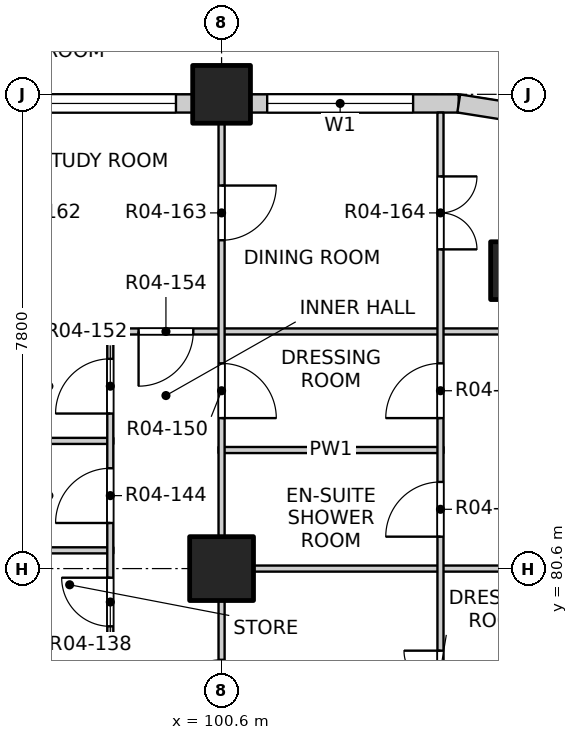
"""IFC4 building model, lengths in metres.
Left out: names, types, materials, properties, quantities, classifications, styles, units other than length and angle.
Written with IfcOpenShell. Run it as: python <this file> out.ifc"""

import sys

from ifc_helpers import new_model, si_unit, direction, frame, frame_2d, origin, origin_2d, place, context, subcontext, project, spatial, rectangle, extrude, element, fill, save


model = new_model("IFC4")
c1 = context("Model", 3, precision=1e-05, world=origin(), true_north=direction((0.0, 1.0)))
c2 = subcontext(c1, "Body", "Model", "MODEL_VIEW")
j1 = project(units=[si_unit("LENGTHUNIT", "METRE"), si_unit("PLANEANGLEUNIT", "RADIAN")], contexts=[c1])
p1 = place(None, origin())
s1 = spatial("IfcSite", under=j1, at=p1, CompositionType="ELEMENT")
p2 = place(p1, origin())
s2 = spatial("IfcBuilding", under=s1, at=p2, CompositionType="ELEMENT")
p3 = place(p2, frame((0.0, 0.0, 58.0)))
s3 = spatial("IfcBuildingStorey", under=s2, at=p3, CompositionType="ELEMENT", Elevation=58.0)
for number, where, z_axis, x_axis in (
    (1, (105.5, 85.5, -0.25), (0.0, 0.0, 1.0), (1.0, 0.0, 0.0)),
    (2, (100.6, 88.4, -0.25), (0.0, 0.0, 1.0), (1.0, 0.0, 0.0)),
):
    element("IfcColumn", number, at=place(p3, frame(where, z_axis=z_axis, x_axis=x_axis)), inside=s3, PredefinedType="COLUMN", context=c2, shape_type="SweptSolid", body=[
        extrude(rectangle(XDim=0.95, YDim=0.95, at=origin_2d()), origin(), (0.0, 0.0, 1.0), 3.4),
    ])
p4 = place(p3, frame((100.6, 80.6, -0.25), z_axis=(0.0, 0.0, 1.0), x_axis=(1.0, 0.0, 0.0)))
e3 = element("IfcColumn", 3, at=p4, inside=s3, PredefinedType="COLUMN", context=c2, shape_type="SweptSolid", body=[
    extrude(rectangle(XDim=1.05, YDim=1.05, at=origin_2d()), origin(), (0.0, 0.0, 1.0), 3.4),
])
p5 = place(p3, frame((93.275, 88.25, 0.0), z_axis=(0.0, 0.0, 1.0), x_axis=(1.0, 0.0, 0.0)))
e4 = element("IfcWall", 4, at=p5, inside=s3, PredefinedType="SOLIDWALL", context=c2, shape_type="SweptSolid", body=[
    extrude(rectangle(XDim=6.85, YDim=0.3, at=frame_2d((3.425, 0.0))), origin(), (0.0, 0.0, 1.0), 2.7),
])
p6 = place(p5, frame((0.275, 0.0, 0.9)))
e5 = element("IfcOpeningElement", 5, at=p6, cuts=e4, PredefinedType="OPENING", context=c2, shape_type="SweptSolid", body=[
    extrude(rectangle(XDim=2.4, YDim=1.8, at=frame_2d((1.2, 0.9))), frame((0.0, 0.16, 0.0), z_axis=(0.0, -1.0, 0.0), x_axis=(1.0, 0.0, 0.0)), (0.0, 0.0, 1.0), 0.32),
])
p7 = place(p5, frame((4.175, 0.0, 0.9)))
e6 = element("IfcOpeningElement", 6, at=p7, cuts=e4, PredefinedType="OPENING", context=c2, shape_type="SweptSolid", body=[
    extrude(rectangle(XDim=2.4, YDim=1.8, at=frame_2d((1.2, 0.9))), frame((0.0, 0.16, 0.0), z_axis=(0.0, -1.0, 0.0), x_axis=(1.0, 0.0, 0.0)), (0.0, 0.0, 1.0), 0.32),
])
p8 = place(p3, frame((101.075, 88.25, 0.0), z_axis=(0.0, 0.0, 1.0), x_axis=(1.0, 0.0, 0.0)))
e7 = element("IfcWall", 7, at=p8, inside=s3, PredefinedType="SOLIDWALL", context=c2, shape_type="SweptSolid", body=[
    extrude(rectangle(XDim=3.425, YDim=0.3, at=frame_2d((1.712, 0.0))), origin(), (0.0, 0.0, 1.0), 2.7),
])
p9 = place(p8, frame((0.275, 0.0, 0.9)))
e8 = element("IfcOpeningElement", 8, at=p9, cuts=e7, PredefinedType="OPENING", context=c2, shape_type="SweptSolid", body=[
    extrude(rectangle(XDim=2.4, YDim=1.8, at=frame_2d((1.2, 0.9))), frame((0.0, 0.16, 0.0), z_axis=(0.0, -1.0, 0.0), x_axis=(1.0, 0.0, 0.0)), (0.0, 0.0, 1.0), 0.32),
])
p10 = place(p3, frame((105.659, 88.066, 0.0), z_axis=(0.0, 0.0, 1.0), x_axis=(-0.987678452879, 0.156496880861, 0.0)))
e9 = element("IfcWall", 9, at=p10, inside=s3, PredefinedType="SOLIDWALL", context=c2, shape_type="SweptSolid", body=[
    extrude(rectangle(XDim=1.173, YDim=0.3, at=frame_2d((0.586, 0.0))), origin(), (0.0, 0.0, 1.0), 2.7),
])
p11 = place(p3, frame((96.6, 79.2, 0.0), z_axis=(0.0, 0.0, 1.0), x_axis=(1.0, 0.0, 0.0)))
e10 = element("IfcWall", 10, at=p11, inside=s3, PredefinedType="PARTITIONING", context=c2, shape_type="SweptSolid", body=[
    extrude(rectangle(XDim=2.22, YDim=0.1, at=frame_2d((1.11, 0.0))), origin(), (0.0, 0.0, 1.0), 3.15),
])
p12 = place(p3, frame((100.55, 80.6, 0.0), z_axis=(0.0, 0.0, 1.0), x_axis=(1.0, 0.0, 0.0)))
e11 = element("IfcWall", 11, at=p12, inside=s3, PredefinedType="PARTITIONING", context=c2, shape_type="SweptSolid", body=[
    extrude(rectangle(XDim=7.55, YDim=0.1, at=frame_2d((3.775, 0.0))), origin(), (0.0, 0.0, 1.0), 2.55),
])
p13 = place(p3, frame((96.6, 80.9, 0.0), z_axis=(0.0, 0.0, 1.0), x_axis=(1.0, 0.0, 0.0)))
e12 = element("IfcWall", 12, at=p13, inside=s3, PredefinedType="PARTITIONING", context=c2, shape_type="SweptSolid", body=[
    extrude(rectangle(XDim=2.22, YDim=0.1, at=frame_2d((1.11, 0.0))), origin(), (0.0, 0.0, 1.0), 3.15),
])
p14 = place(p3, frame((100.55, 82.55, 0.0), z_axis=(0.0, 0.0, 1.0), x_axis=(1.0, 0.0, 0.0)))
e13 = element("IfcWall", 13, at=p14, inside=s3, PredefinedType="PARTITIONING", context=c2, shape_type="SweptSolid", body=[
    extrude(rectangle(XDim=3.7, YDim=0.1, at=frame_2d((1.85, 0.0))), origin(), (0.0, 0.0, 1.0), 3.15),
])
p15 = place(p3, frame((96.6, 82.7, 0.0), z_axis=(0.0, 0.0, 1.0), x_axis=(1.0, 0.0, 0.0)))
e14 = element("IfcWall", 14, at=p15, inside=s3, PredefinedType="PARTITIONING", context=c2, shape_type="SweptSolid", body=[
    extrude(rectangle(XDim=2.22, YDim=0.1, at=frame_2d((1.11, 0.0))), origin(), (0.0, 0.0, 1.0), 3.15),
])
p16 = place(p3, frame((96.6, 84.5, 0.0), z_axis=(0.0, 0.0, 1.0), x_axis=(1.0, 0.0, 0.0)))
e15 = element("IfcWall", 15, at=p16, inside=s3, PredefinedType="PARTITIONING", context=c2, shape_type="SweptSolid", body=[
    extrude(rectangle(XDim=11.5, YDim=0.1, at=frame_2d((5.75, 0.0))), origin(), (0.0, 0.0, 1.0), 3.15),
])
p17 = place(p16, frame((2.635, 0.0, 0.0)))
e16 = element("IfcOpeningElement", 16, at=p17, cuts=e15, PredefinedType="OPENING", context=c2, shape_type="SweptSolid", body=[
    extrude(rectangle(XDim=0.9, YDim=2.1, at=frame_2d((0.45, 1.05))), frame((0.0, 0.06, 0.0), z_axis=(0.0, -1.0, 0.0), x_axis=(1.0, 0.0, 0.0)), (0.0, 0.0, 1.0), 0.12),
])
p18 = place(p3, frame((98.77, 79.25, 0.0), z_axis=(0.0, 0.0, 1.0), x_axis=(0.0, 1.0, 0.0)))
e17 = element("IfcWall", 17, at=p18, inside=s3, PredefinedType="PARTITIONING", context=c2, shape_type="SweptSolid", body=[
    extrude(rectangle(XDim=5.2, YDim=0.1, at=frame_2d((2.6, 0.0))), origin(), (0.0, 0.0, 1.0), 3.15),
])
p19 = place(p18, frame((0.4, 0.0, 0.0)))
e18 = element("IfcOpeningElement", 18, at=p19, cuts=e17, PredefinedType="OPENING", context=c2, shape_type="SweptSolid", body=[
    extrude(rectangle(XDim=0.8, YDim=2.1, at=frame_2d((0.4, 1.05))), frame((0.0, 0.06, 0.0), z_axis=(0.0, -1.0, 0.0), x_axis=(1.0, 0.0, 0.0)), (0.0, 0.0, 1.0), 0.12),
])
p20 = place(p18, frame((2.1, 0.0, 0.0)))
e19 = element("IfcOpeningElement", 19, at=p20, cuts=e17, PredefinedType="OPENING", context=c2, shape_type="SweptSolid", body=[
    extrude(rectangle(XDim=0.9, YDim=2.1, at=frame_2d((0.45, 1.05))), frame((0.0, 0.06, 0.0), z_axis=(0.0, -1.0, 0.0), x_axis=(1.0, 0.0, 0.0)), (0.0, 0.0, 1.0), 0.12),
])
p21 = place(p18, frame((3.9, 0.0, 0.0)))
e20 = element("IfcOpeningElement", 20, at=p21, cuts=e17, PredefinedType="OPENING", context=c2, shape_type="SweptSolid", body=[
    extrude(rectangle(XDim=0.9, YDim=2.1, at=frame_2d((0.45, 1.05))), frame((0.0, 0.06, 0.0), z_axis=(0.0, -1.0, 0.0), x_axis=(1.0, 0.0, 0.0)), (0.0, 0.0, 1.0), 0.12),
])
p22 = place(p3, frame((100.6, 49.4, 0.0), z_axis=(0.0, 0.0, 1.0), x_axis=(0.0, 1.0, 0.0)))
e21 = element("IfcWall", 21, at=p22, inside=s3, PredefinedType="PARTITIONING", context=c2, shape_type="SweptSolid", body=[
    extrude(rectangle(XDim=31.2, YDim=0.1, at=frame_2d((15.6, 0.0))), origin(), (0.0, 0.0, 1.0), 3.15),
])
p23 = place(p22, frame((2.475, 0.0, 0.0)))
e22 = element("IfcOpeningElement", 22, at=p23, cuts=e21, PredefinedType="OPENING", context=c2, shape_type="SweptSolid", body=[
    extrude(rectangle(XDim=0.9, YDim=2.1, at=frame_2d((0.45, 1.05))), frame((0.0, 0.06, 0.0), z_axis=(0.0, -1.0, 0.0), x_axis=(1.0, 0.0, 0.0)), (0.0, 0.0, 1.0), 0.12),
])
p24 = place(p22, frame((5.4, 0.0, 0.0)))
e23 = element("IfcOpeningElement", 23, at=p24, cuts=e21, PredefinedType="OPENING", context=c2, shape_type="SweptSolid", body=[
    extrude(rectangle(XDim=0.9, YDim=2.1, at=frame_2d((0.45, 1.05))), frame((0.0, 0.06, 0.0), z_axis=(0.0, -1.0, 0.0), x_axis=(1.0, 0.0, 0.0)), (0.0, 0.0, 1.0), 0.12),
])
p25 = place(p22, frame((10.275, 0.0, 0.0)))
e24 = element("IfcOpeningElement", 24, at=p25, cuts=e21, PredefinedType="OPENING", context=c2, shape_type="SweptSolid", body=[
    extrude(rectangle(XDim=0.9, YDim=2.1, at=frame_2d((0.45, 1.05))), frame((0.0, 0.06, 0.0), z_axis=(0.0, -1.0, 0.0), x_axis=(1.0, 0.0, 0.0)), (0.0, 0.0, 1.0), 0.12),
])
p26 = place(p22, frame((13.2, 0.0, 0.0)))
e25 = element("IfcOpeningElement", 25, at=p26, cuts=e21, PredefinedType="OPENING", context=c2, shape_type="SweptSolid", body=[
    extrude(rectangle(XDim=0.9, YDim=2.1, at=frame_2d((0.45, 1.05))), frame((0.0, 0.06, 0.0), z_axis=(0.0, -1.0, 0.0), x_axis=(1.0, 0.0, 0.0)), (0.0, 0.0, 1.0), 0.12),
])
p27 = place(p22, frame((17.1, 0.0, 0.0)))
e26 = element("IfcOpeningElement", 26, at=p27, cuts=e21, PredefinedType="OPENING", context=c2, shape_type="SweptSolid", body=[
    extrude(rectangle(XDim=0.9, YDim=2.1, at=frame_2d((0.45, 1.05))), frame((0.0, 0.06, 0.0), z_axis=(0.0, -1.0, 0.0), x_axis=(1.0, 0.0, 0.0)), (0.0, 0.0, 1.0), 0.12),
])
p28 = place(p22, frame((21.8, 0.0, 0.0)))
e27 = element("IfcOpeningElement", 27, at=p28, cuts=e21, PredefinedType="OPENING", context=c2, shape_type="SweptSolid", body=[
    extrude(rectangle(XDim=0.9, YDim=2.1, at=frame_2d((0.45, 1.05))), frame((0.0, 0.06, 0.0), z_axis=(0.0, -1.0, 0.0), x_axis=(1.0, 0.0, 0.0)), (0.0, 0.0, 1.0), 0.12),
])
p29 = place(p22, frame((25.875, 0.0, 0.0)))
e28 = element("IfcOpeningElement", 28, at=p29, cuts=e21, PredefinedType="OPENING", context=c2, shape_type="SweptSolid", body=[
    extrude(rectangle(XDim=0.9, YDim=2.1, at=frame_2d((0.45, 1.05))), frame((0.0, 0.06, 0.0), z_axis=(0.0, -1.0, 0.0), x_axis=(1.0, 0.0, 0.0)), (0.0, 0.0, 1.0), 0.12),
])
p30 = place(p22, frame((28.8, 0.0, 0.0)))
e29 = element("IfcOpeningElement", 29, at=p30, cuts=e21, PredefinedType="OPENING", context=c2, shape_type="SweptSolid", body=[
    extrude(rectangle(XDim=0.9, YDim=2.1, at=frame_2d((0.45, 1.05))), frame((0.0, 0.06, 0.0), z_axis=(0.0, -1.0, 0.0), x_axis=(1.0, 0.0, 0.0)), (0.0, 0.0, 1.0), 0.12),
])
p31 = place(p3, frame((100.6, 80.6, 0.0), z_axis=(0.0, 0.0, 1.0), x_axis=(0.0, 1.0, 0.0)))
e30 = element("IfcWall", 30, at=p31, inside=s3, PredefinedType="PARTITIONING", context=c2, shape_type="SweptSolid", body=[
    extrude(rectangle(XDim=7.5, YDim=0.1, at=frame_2d((3.75, 0.0))), origin(), (0.0, 0.0, 1.0), 2.55),
])
p32 = place(p31, frame((2.475, 0.0, 0.0)))
e31 = element("IfcOpeningElement", 31, at=p32, cuts=e30, PredefinedType="OPENING", context=c2, shape_type="SweptSolid", body=[
    extrude(rectangle(XDim=0.9, YDim=2.1, at=frame_2d((0.45, 1.05))), frame((0.0, 0.06, 0.0), z_axis=(0.0, -1.0, 0.0), x_axis=(1.0, 0.0, 0.0)), (0.0, 0.0, 1.0), 0.12),
])
p33 = place(p31, frame((5.4, 0.0, 0.0)))
e32 = element("IfcOpeningElement", 32, at=p33, cuts=e30, PredefinedType="OPENING", context=c2, shape_type="SweptSolid", body=[
    extrude(rectangle(XDim=0.9, YDim=2.1, at=frame_2d((0.45, 1.05))), frame((0.0, 0.06, 0.0), z_axis=(0.0, -1.0, 0.0), x_axis=(1.0, 0.0, 0.0)), (0.0, 0.0, 1.0), 0.12),
])
p34 = place(p3, frame((104.2, 41.9, 0.0), z_axis=(0.0, 0.0, 1.0), x_axis=(0.0, 1.0, 0.0)))
e33 = element("IfcWall", 33, at=p34, inside=s3, PredefinedType="PARTITIONING", context=c2, shape_type="SweptSolid", body=[
    extrude(rectangle(XDim=46.2, YDim=0.1, at=frame_2d((23.1, 0.0))), origin(), (0.0, 0.0, 1.0), 3.15),
])
p35 = place(p34, frame((1.05, 0.0, 0.0)))
e34 = element("IfcOpeningElement", 34, at=p35, cuts=e33, PredefinedType="OPENING", context=c2, shape_type="SweptSolid", body=[
    extrude(rectangle(XDim=1.2, YDim=2.1, at=frame_2d((0.6, 1.05))), frame((0.0, 0.06, 0.0), z_axis=(0.0, -1.0, 0.0), x_axis=(1.0, 0.0, 0.0)), (0.0, 0.0, 1.0), 0.12),
])
p36 = place(p34, frame((4.125, 0.0, 0.0)))
e35 = element("IfcOpeningElement", 35, at=p36, cuts=e33, PredefinedType="OPENING", context=c2, shape_type="SweptSolid", body=[
    extrude(rectangle(XDim=0.9, YDim=2.1, at=frame_2d((0.45, 1.05))), frame((0.0, 0.06, 0.0), z_axis=(0.0, -1.0, 0.0), x_axis=(1.0, 0.0, 0.0)), (0.0, 0.0, 1.0), 0.12),
])
p37 = place(p34, frame((6.075, 0.0, 0.0)))
e36 = element("IfcOpeningElement", 36, at=p37, cuts=e33, PredefinedType="OPENING", context=c2, shape_type="SweptSolid", body=[
    extrude(rectangle(XDim=0.9, YDim=2.1, at=frame_2d((0.45, 1.05))), frame((0.0, 0.06, 0.0), z_axis=(0.0, -1.0, 0.0), x_axis=(1.0, 0.0, 0.0)), (0.0, 0.0, 1.0), 0.12),
])
p38 = place(p34, frame((8.025, 0.0, 0.0)))
e37 = element("IfcOpeningElement", 37, at=p38, cuts=e33, PredefinedType="OPENING", context=c2, shape_type="SweptSolid", body=[
    extrude(rectangle(XDim=0.9, YDim=2.1, at=frame_2d((0.45, 1.05))), frame((0.0, 0.06, 0.0), z_axis=(0.0, -1.0, 0.0), x_axis=(1.0, 0.0, 0.0)), (0.0, 0.0, 1.0), 0.12),
])
p39 = place(p34, frame((9.975, 0.0, 0.0)))
e38 = element("IfcOpeningElement", 38, at=p39, cuts=e33, PredefinedType="OPENING", context=c2, shape_type="SweptSolid", body=[
    extrude(rectangle(XDim=0.9, YDim=2.1, at=frame_2d((0.45, 1.05))), frame((0.0, 0.06, 0.0), z_axis=(0.0, -1.0, 0.0), x_axis=(1.0, 0.0, 0.0)), (0.0, 0.0, 1.0), 0.12),
])
p40 = place(p34, frame((12.75, 0.0, 0.0)))
e39 = element("IfcOpeningElement", 39, at=p40, cuts=e33, PredefinedType="OPENING", context=c2, shape_type="SweptSolid", body=[
    extrude(rectangle(XDim=1.2, YDim=2.1, at=frame_2d((0.6, 1.05))), frame((0.0, 0.06, 0.0), z_axis=(0.0, -1.0, 0.0), x_axis=(1.0, 0.0, 0.0)), (0.0, 0.0, 1.0), 0.12),
])
p41 = place(p34, frame((15.825, 0.0, 0.0)))
e40 = element("IfcOpeningElement", 40, at=p41, cuts=e33, PredefinedType="OPENING", context=c2, shape_type="SweptSolid", body=[
    extrude(rectangle(XDim=0.9, YDim=2.1, at=frame_2d((0.45, 1.05))), frame((0.0, 0.06, 0.0), z_axis=(0.0, -1.0, 0.0), x_axis=(1.0, 0.0, 0.0)), (0.0, 0.0, 1.0), 0.12),
])
p42 = place(p34, frame((17.775, 0.0, 0.0)))
e41 = element("IfcOpeningElement", 41, at=p42, cuts=e33, PredefinedType="OPENING", context=c2, shape_type="SweptSolid", body=[
    extrude(rectangle(XDim=0.9, YDim=2.1, at=frame_2d((0.45, 1.05))), frame((0.0, 0.06, 0.0), z_axis=(0.0, -1.0, 0.0), x_axis=(1.0, 0.0, 0.0)), (0.0, 0.0, 1.0), 0.12),
])
p43 = place(p34, frame((20.55, 0.0, 0.0)))
e42 = element("IfcOpeningElement", 42, at=p43, cuts=e33, PredefinedType="OPENING", context=c2, shape_type="SweptSolid", body=[
    extrude(rectangle(XDim=1.2, YDim=2.1, at=frame_2d((0.6, 1.05))), frame((0.0, 0.06, 0.0), z_axis=(0.0, -1.0, 0.0), x_axis=(1.0, 0.0, 0.0)), (0.0, 0.0, 1.0), 0.12),
])
p44 = place(p34, frame((24.45, 0.0, 0.0)))
e43 = element("IfcOpeningElement", 43, at=p44, cuts=e33, PredefinedType="OPENING", context=c2, shape_type="SweptSolid", body=[
    extrude(rectangle(XDim=1.2, YDim=2.1, at=frame_2d((0.6, 1.05))), frame((0.0, 0.06, 0.0), z_axis=(0.0, -1.0, 0.0), x_axis=(1.0, 0.0, 0.0)), (0.0, 0.0, 1.0), 0.12),
])
p45 = place(p34, frame((27.525, 0.0, 0.0)))
e44 = element("IfcOpeningElement", 44, at=p45, cuts=e33, PredefinedType="OPENING", context=c2, shape_type="SweptSolid", body=[
    extrude(rectangle(XDim=0.9, YDim=2.1, at=frame_2d((0.45, 1.05))), frame((0.0, 0.06, 0.0), z_axis=(0.0, -1.0, 0.0), x_axis=(1.0, 0.0, 0.0)), (0.0, 0.0, 1.0), 0.12),
])
p46 = place(p34, frame((29.475, 0.0, 0.0)))
e45 = element("IfcOpeningElement", 45, at=p46, cuts=e33, PredefinedType="OPENING", context=c2, shape_type="SweptSolid", body=[
    extrude(rectangle(XDim=0.9, YDim=2.1, at=frame_2d((0.45, 1.05))), frame((0.0, 0.06, 0.0), z_axis=(0.0, -1.0, 0.0), x_axis=(1.0, 0.0, 0.0)), (0.0, 0.0, 1.0), 0.12),
])
p47 = place(p34, frame((31.425, 0.0, 0.0)))
e46 = element("IfcOpeningElement", 46, at=p47, cuts=e33, PredefinedType="OPENING", context=c2, shape_type="SweptSolid", body=[
    extrude(rectangle(XDim=0.9, YDim=2.1, at=frame_2d((0.45, 1.05))), frame((0.0, 0.06, 0.0), z_axis=(0.0, -1.0, 0.0), x_axis=(1.0, 0.0, 0.0)), (0.0, 0.0, 1.0), 0.12),
])
p48 = place(p34, frame((33.375, 0.0, 0.0)))
e47 = element("IfcOpeningElement", 47, at=p48, cuts=e33, PredefinedType="OPENING", context=c2, shape_type="SweptSolid", body=[
    extrude(rectangle(XDim=0.9, YDim=2.1, at=frame_2d((0.45, 1.05))), frame((0.0, 0.06, 0.0), z_axis=(0.0, -1.0, 0.0), x_axis=(1.0, 0.0, 0.0)), (0.0, 0.0, 1.0), 0.12),
])
p49 = place(p34, frame((36.15, 0.0, 0.0)))
e48 = element("IfcOpeningElement", 48, at=p49, cuts=e33, PredefinedType="OPENING", context=c2, shape_type="SweptSolid", body=[
    extrude(rectangle(XDim=1.2, YDim=2.1, at=frame_2d((0.6, 1.05))), frame((0.0, 0.06, 0.0), z_axis=(0.0, -1.0, 0.0), x_axis=(1.0, 0.0, 0.0)), (0.0, 0.0, 1.0), 0.12),
])
p50 = place(p34, frame((39.225, 0.0, 0.0)))
e49 = element("IfcOpeningElement", 49, at=p50, cuts=e33, PredefinedType="OPENING", context=c2, shape_type="SweptSolid", body=[
    extrude(rectangle(XDim=0.9, YDim=2.1, at=frame_2d((0.45, 1.05))), frame((0.0, 0.06, 0.0), z_axis=(0.0, -1.0, 0.0), x_axis=(1.0, 0.0, 0.0)), (0.0, 0.0, 1.0), 0.12),
])
p51 = place(p34, frame((41.175, 0.0, 0.0)))
e50 = element("IfcOpeningElement", 50, at=p51, cuts=e33, PredefinedType="OPENING", context=c2, shape_type="SweptSolid", body=[
    extrude(rectangle(XDim=0.9, YDim=2.1, at=frame_2d((0.45, 1.05))), frame((0.0, 0.06, 0.0), z_axis=(0.0, -1.0, 0.0), x_axis=(1.0, 0.0, 0.0)), (0.0, 0.0, 1.0), 0.12),
])
p52 = place(p34, frame((43.95, 0.0, 0.0)))
e51 = element("IfcOpeningElement", 51, at=p52, cuts=e33, PredefinedType="OPENING", context=c2, shape_type="SweptSolid", body=[
    extrude(rectangle(XDim=1.2, YDim=2.1, at=frame_2d((0.6, 1.05))), frame((0.0, 0.06, 0.0), z_axis=(0.0, -1.0, 0.0), x_axis=(1.0, 0.0, 0.0)), (0.0, 0.0, 1.0), 0.12),
])
p53 = place(p7, origin())
e52 = element("IfcWindow", 52, at=p53, inside=s3, PartitioningType="DOUBLE_PANEL_VERTICAL", PredefinedType="WINDOW", context=c2, shape_type="SweptSolid", body=[
    extrude(rectangle(XDim=2.4, YDim=1.8, at=frame_2d((1.2, 0.9))), frame((0.0, 0.03, 0.0), z_axis=(0.0, -1.0, 0.0), x_axis=(1.0, 0.0, 0.0)), (0.0, 0.0, 1.0), 0.06),
])
fill(e6, e52)
p54 = place(p9, origin())
e53 = element("IfcWindow", 53, at=p54, inside=s3, PartitioningType="DOUBLE_PANEL_VERTICAL", PredefinedType="WINDOW", context=c2, shape_type="SweptSolid", body=[
    extrude(rectangle(XDim=2.4, YDim=1.8, at=frame_2d((1.2, 0.9))), frame((0.0, 0.03, 0.0), z_axis=(0.0, -1.0, 0.0), x_axis=(1.0, 0.0, 0.0)), (0.0, 0.0, 1.0), 0.06),
])
fill(e8, e53)
p55 = place(p49, origin())
e54 = element("IfcDoor", 54, at=p55, inside=s3, OperationType="DOUBLE_DOOR_SINGLE_SWING", PredefinedType="DOOR", context=c2, shape_type="SweptSolid", body=[
    extrude(rectangle(XDim=1.2, YDim=2.1, at=frame_2d((0.6, 1.05))), frame((0.0, 0.025, 0.0), z_axis=(0.0, -1.0, 0.0), x_axis=(1.0, 0.0, 0.0)), (0.0, 0.0, 1.0), 0.05),
])
fill(e48, e54)
p56 = place(p19, origin())
e55 = element("IfcDoor", 55, at=p56, inside=s3, OperationType="SINGLE_SWING_RIGHT", PredefinedType="DOOR", context=c2, shape_type="SweptSolid", body=[
    extrude(rectangle(XDim=0.8, YDim=2.1, at=frame_2d((0.4, 1.05))), frame((0.0, 0.025, 0.0), z_axis=(0.0, -1.0, 0.0), x_axis=(1.0, 0.0, 0.0)), (0.0, 0.0, 1.0), 0.05),
])
fill(e18, e55)
p57 = place(p50, origin())
e56 = element("IfcDoor", 56, at=p57, inside=s3, OperationType="SINGLE_SWING_LEFT", PredefinedType="DOOR", context=c2, shape_type="SweptSolid", body=[
    extrude(rectangle(XDim=0.9, YDim=2.1, at=frame_2d((0.45, 1.05))), frame((0.0, 0.025, 0.0), z_axis=(0.0, -1.0, 0.0), x_axis=(1.0, 0.0, 0.0)), (0.0, 0.0, 1.0), 0.05),
])
fill(e49, e56)
p58 = place(p20, origin())
e57 = element("IfcDoor", 57, at=p58, inside=s3, OperationType="SINGLE_SWING_LEFT", PredefinedType="DOOR", context=c2, shape_type="SweptSolid", body=[
    extrude(rectangle(XDim=0.9, YDim=2.1, at=frame_2d((0.45, 1.05))), frame((0.0, 0.025, 0.0), z_axis=(0.0, -1.0, 0.0), x_axis=(1.0, 0.0, 0.0)), (0.0, 0.0, 1.0), 0.05),
])
fill(e19, e57)
p59 = place(p32, origin())
e58 = element("IfcDoor", 58, at=p59, inside=s3, OperationType="SINGLE_SWING_RIGHT", PredefinedType="DOOR", context=c2, shape_type="SweptSolid", body=[
    extrude(rectangle(XDim=0.9, YDim=2.1, at=frame_2d((0.45, 1.05))), frame((0.0, 0.025, 0.0), z_axis=(0.0, -1.0, 0.0), x_axis=(1.0, 0.0, 0.0)), (0.0, 0.0, 1.0), 0.05),
])
fill(e31, e58)
p60 = place(p51, origin())
e59 = element("IfcDoor", 59, at=p60, inside=s3, OperationType="SINGLE_SWING_LEFT", PredefinedType="DOOR", context=c2, shape_type="SweptSolid", body=[
    extrude(rectangle(XDim=0.9, YDim=2.1, at=frame_2d((0.45, 1.05))), frame((0.0, 0.025, 0.0), z_axis=(0.0, -1.0, 0.0), x_axis=(1.0, 0.0, 0.0)), (0.0, 0.0, 1.0), 0.05),
])
fill(e50, e59)
p61 = place(p21, origin())
e60 = element("IfcDoor", 60, at=p61, inside=s3, OperationType="SINGLE_SWING_LEFT", PredefinedType="DOOR", context=c2, shape_type="SweptSolid", body=[
    extrude(rectangle(XDim=0.9, YDim=2.1, at=frame_2d((0.45, 1.05))), frame((0.0, 0.025, 0.0), z_axis=(0.0, -1.0, 0.0), x_axis=(1.0, 0.0, 0.0)), (0.0, 0.0, 1.0), 0.05),
])
fill(e20, e60)
p62 = place(p17, origin())
e61 = element("IfcDoor", 61, at=p62, inside=s3, OperationType="SINGLE_SWING_RIGHT", PredefinedType="DOOR", context=c2, shape_type="SweptSolid", body=[
    extrude(rectangle(XDim=0.9, YDim=2.1, at=frame_2d((0.45, 1.05))), frame((0.0, 0.025, 0.0), z_axis=(0.0, -1.0, 0.0), x_axis=(1.0, 0.0, 0.0)), (0.0, 0.0, 1.0), 0.05),
])
fill(e16, e61)
p63 = place(p33, origin())
e62 = element("IfcDoor", 62, at=p63, inside=s3, OperationType="SINGLE_SWING_LEFT", PredefinedType="DOOR", context=c2, shape_type="SweptSolid", body=[
    extrude(rectangle(XDim=0.9, YDim=2.1, at=frame_2d((0.45, 1.05))), frame((0.0, 0.025, 0.0), z_axis=(0.0, -1.0, 0.0), x_axis=(1.0, 0.0, 0.0)), (0.0, 0.0, 1.0), 0.05),
])
fill(e32, e62)
p64 = place(p52, origin())
e63 = element("IfcDoor", 63, at=p64, inside=s3, OperationType="DOUBLE_DOOR_SINGLE_SWING", PredefinedType="DOOR", context=c2, shape_type="SweptSolid", body=[
    extrude(rectangle(XDim=1.2, YDim=2.1, at=frame_2d((0.6, 1.05))), frame((0.0, 0.025, 0.0), z_axis=(0.0, -1.0, 0.0), x_axis=(1.0, 0.0, 0.0)), (0.0, 0.0, 1.0), 0.05),
])
fill(e51, e63)
save(model, sys.argv[1])
